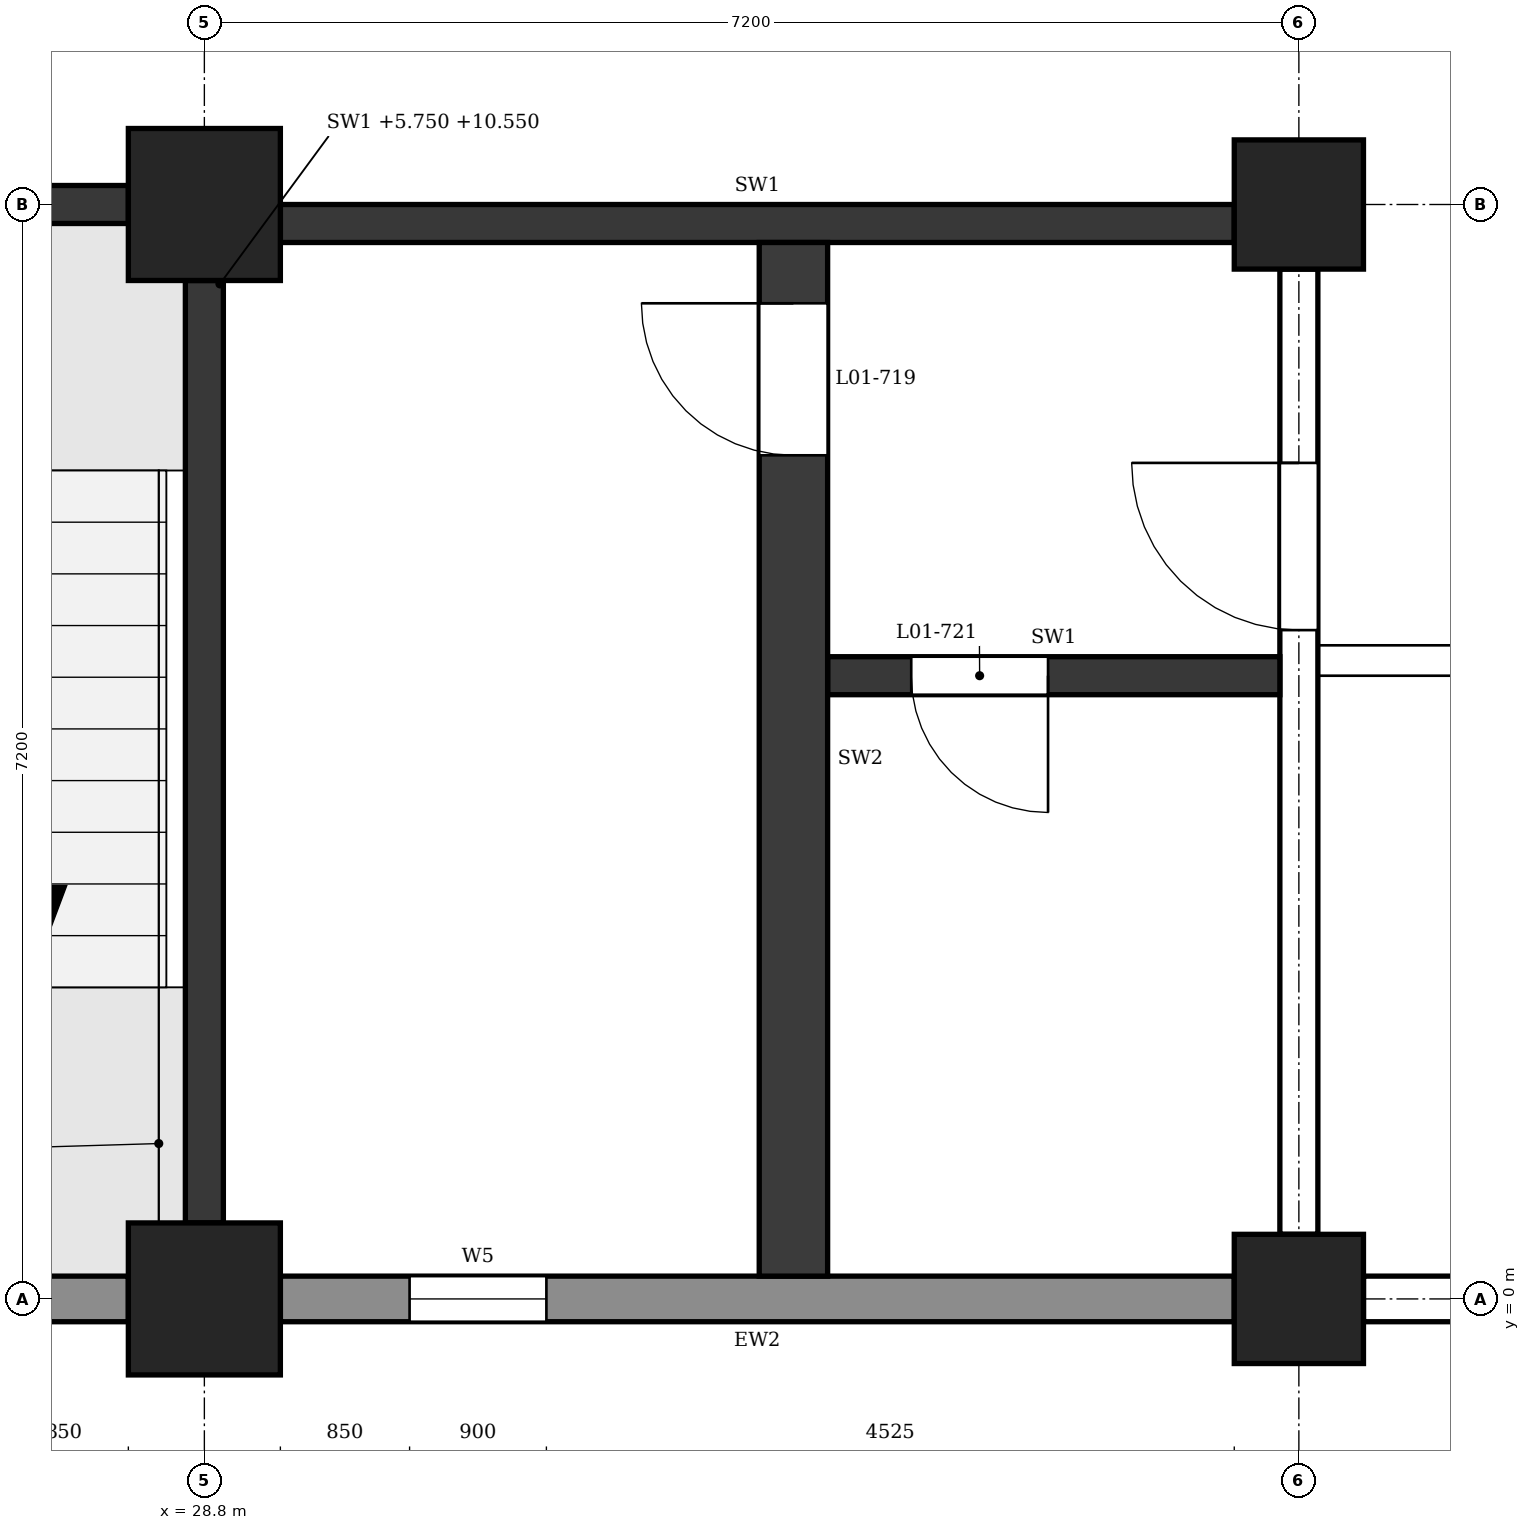
"""IFC4 building model, lengths in metres.
Left out: names, types, materials, properties, quantities, classifications, styles, units other than length and angle.
Written with IfcOpenShell. Run it as: python <this file> out.ifc"""

import sys

from ifc_helpers import new_model, si_unit, direction, frame, frame_2d, origin, origin_2d, place, context, subcontext, project, spatial, polyline, rectangle, outline, extrude, element, fill, save


model = new_model("IFC4")
c1 = context("Model", 3, precision=1e-05, world=origin(), true_north=direction((0.0, 1.0)))
c2 = subcontext(c1, "Body", "Model", "MODEL_VIEW")
j1 = project(units=[si_unit("LENGTHUNIT", "METRE"), si_unit("PLANEANGLEUNIT", "RADIAN")], contexts=[c1])
p1 = place(None, origin())
s1 = spatial("IfcSite", under=j1, at=p1, CompositionType="ELEMENT")
p2 = place(p1, origin())
s2 = spatial("IfcBuilding", under=s1, at=p2, CompositionType="ELEMENT")
p3 = place(p2, frame((0.0, 0.0, 6.0)))
s3 = spatial("IfcBuildingStorey", under=s2, at=p3, CompositionType="ELEMENT", Elevation=6.0)
for number, where, z_axis, x_axis in (
    (1, (28.8, 0.0, 0.0), (0.0, 0.0, 1.0), (1.0, 0.0, 0.0)),
    (2, (28.8, 7.2, 0.0), (0.0, 0.0, 1.0), (1.0, 0.0, 0.0)),
):
    element("IfcColumn", number, at=place(p3, frame(where, z_axis=z_axis, x_axis=x_axis)), inside=s3, PredefinedType="COLUMN", context=c2, shape_type="SweptSolid", body=[
        extrude(rectangle(XDim=1.0, YDim=1.0, at=origin_2d()), origin(), (0.0, 0.0, 1.0), 5.4),
    ])
for number, where, z_axis, x_axis in (
    (3, (36.0, 0.0, 0.0), (0.0, 0.0, 1.0), (1.0, 0.0, 0.0)),
    (4, (36.0, 7.2, 0.0), (0.0, 0.0, 1.0), (1.0, 0.0, 0.0)),
):
    element("IfcColumn", number, at=place(p3, frame(where, z_axis=z_axis, x_axis=x_axis)), inside=s3, PredefinedType="COLUMN", context=c2, shape_type="SweptSolid", body=[
        extrude(rectangle(XDim=0.85, YDim=0.85, at=origin_2d()), origin(), (0.0, 0.0, 1.0), 5.4),
    ])
p4 = place(p3, frame((22.1, 0.0, 0.0), z_axis=(0.0, 0.0, 1.0), x_axis=(1.0, 0.0, 0.0)))
e5 = element("IfcWall", 5, at=p4, inside=s3, PredefinedType="STANDARD", context=c2, shape_type="SweptSolid", body=[
    extrude(rectangle(XDim=6.2, YDim=0.3, at=frame_2d((3.1, 0.0))), origin(), (0.0, 0.0, 1.0), 4.55),
])
p5 = place(p4, frame((4.45, 0.0, 0.9)))
e6 = element("IfcOpeningElement", 6, at=p5, cuts=e5, PredefinedType="OPENING", context=c2, shape_type="SweptSolid", body=[
    extrude(outline(polyline([(0.0, 0.0), (0.9, 0.0), (0.9, 3.15), (0.45, 3.6), (0.0, 3.15), (0.0, 0.0)])), frame((0.0, 0.16, 0.0), z_axis=(0.0, -1.0, 0.0), x_axis=(1.0, 0.0, 0.0)), (0.0, 0.0, 1.0), 0.32),
])
p6 = place(p3, frame((29.3, 0.0, 0.0), z_axis=(0.0, 0.0, 1.0), x_axis=(1.0, 0.0, 0.0)))
e7 = element("IfcWall", 7, at=p6, inside=s3, PredefinedType="STANDARD", context=c2, shape_type="SweptSolid", body=[
    extrude(rectangle(XDim=6.275, YDim=0.3, at=frame_2d((3.137, 0.0))), origin(), (0.0, 0.0, 1.0), 4.7),
])
p7 = place(p6, frame((0.85, 0.0, 0.9)))
e8 = element("IfcOpeningElement", 8, at=p7, cuts=e7, PredefinedType="OPENING", context=c2, shape_type="SweptSolid", body=[
    extrude(outline(polyline([(0.0, 0.0), (0.9, 0.0), (0.9, 3.15), (0.45, 3.6), (0.0, 3.15), (0.0, 0.0)])), frame((0.0, 0.16, 0.0), z_axis=(0.0, -1.0, 0.0), x_axis=(1.0, 0.0, 0.0)), (0.0, 0.0, 1.0), 0.32),
])
p8 = place(p3, frame((36.425, 0.0, 0.0), z_axis=(0.0, 0.0, 1.0), x_axis=(1.0, 0.0, 0.0)))
e9 = element("IfcWall", 9, at=p8, inside=s3, PredefinedType="STANDARD", context=c2, shape_type="SweptSolid", body=[
    extrude(rectangle(XDim=6.35, YDim=0.3, at=frame_2d((3.175, 0.0))), origin(), (0.0, 0.0, 1.0), 4.7),
])
p9 = place(p8, frame((0.625, 0.0, 0.9)))
e10 = element("IfcOpeningElement", 10, at=p9, cuts=e9, PredefinedType="OPENING", context=c2, shape_type="SweptSolid", body=[
    extrude(outline(polyline([(0.0, 0.0), (1.5, 0.0), (1.5, 2.85), (0.75, 3.6), (0.0, 2.85), (0.0, 0.0)])), frame((0.0, 0.16, 0.0), z_axis=(0.0, -1.0, 0.0), x_axis=(1.0, 0.0, 0.0)), (0.0, 0.0, 1.0), 0.32),
])
p10 = place(p8, frame((4.225, 0.0, 0.9)))
e11 = element("IfcOpeningElement", 11, at=p10, cuts=e9, PredefinedType="OPENING", context=c2, shape_type="SweptSolid", body=[
    extrude(outline(polyline([(0.0, 0.0), (1.5, 0.0), (1.5, 2.85), (0.75, 3.6), (0.0, 2.85), (0.0, 0.0)])), frame((0.0, 0.16, 0.0), z_axis=(0.0, -1.0, 0.0), x_axis=(1.0, 0.0, 0.0)), (0.0, 0.0, 1.0), 0.32),
])
p11 = place(p3, frame((29.3, 7.075, 0.0), z_axis=(0.0, 0.0, 1.0), x_axis=(1.0, 0.0, 0.0)))
e12 = element("IfcWall", 12, at=p11, inside=s3, PredefinedType="SHEAR", context=c2, shape_type="SweptSolid", body=[
    extrude(rectangle(XDim=6.275, YDim=0.25, at=frame_2d((3.137, 0.0))), origin(), (0.0, 0.0, 1.0), 4.7),
])
p12 = place(p3, frame((28.8, 0.5, -0.25), z_axis=(0.0, 0.0, 1.0), x_axis=(0.0, 1.0, 0.0)))
e13 = element("IfcWall", 13, at=p12, inside=s3, PredefinedType="SHEAR", context=c2, shape_type="SweptSolid", body=[
    extrude(rectangle(XDim=6.2, YDim=0.25, at=frame_2d((3.1, 0.0))), origin(), (0.0, 0.0, 1.0), 4.8),
])
p13 = place(p3, frame((36.0, 0.425, 0.0), z_axis=(0.0, 0.0, 1.0), x_axis=(0.0, 1.0, 0.0)))
e14 = element("IfcWall", 14, at=p13, inside=s3, PredefinedType="SHEAR", context=c2, shape_type="SweptSolid", body=[
    extrude(rectangle(XDim=6.35, YDim=0.25, at=frame_2d((3.175, 0.0))), origin(), (0.0, 0.0, 1.0), 4.7),
])
p14 = place(p13, frame((3.975, 0.0, 0.0)))
e15 = element("IfcOpeningElement", 15, at=p14, cuts=e14, PredefinedType="OPENING", context=c2, shape_type="SweptSolid", body=[
    extrude(rectangle(XDim=1.1, YDim=2.1, at=frame_2d((0.55, 1.05))), frame((0.0, 0.135, 0.0), z_axis=(0.0, -1.0, 0.0), x_axis=(1.0, 0.0, 0.0)), (0.0, 0.0, 1.0), 0.27),
])
p15 = place(p3, frame((32.675, 0.15, 0.0), z_axis=(0.0, 0.0, 1.0), x_axis=(0.0, 1.0, 0.0)))
e16 = element("IfcWall", 16, at=p15, inside=s3, PredefinedType="SHEAR", context=c2, shape_type="SweptSolid", body=[
    extrude(rectangle(XDim=6.8, YDim=0.45, at=frame_2d((3.4, 0.0))), origin(), (0.0, 0.0, 1.0), 4.7),
])
p16 = place(p15, frame((5.4, 0.0, 0.0)))
e17 = element("IfcOpeningElement", 17, at=p16, cuts=e16, PredefinedType="OPENING", context=c2, shape_type="SweptSolid", body=[
    extrude(rectangle(XDim=1.0, YDim=2.1, at=frame_2d((0.5, 1.05))), frame((0.0, 0.235, 0.0), z_axis=(0.0, -1.0, 0.0), x_axis=(1.0, 0.0, 0.0)), (0.0, 0.0, 1.0), 0.47),
])
p17 = place(p3, frame((32.9, 4.1, 0.0), z_axis=(0.0, 0.0, 1.0), x_axis=(1.0, 0.0, 0.0)))
e18 = element("IfcWall", 18, at=p17, inside=s3, PredefinedType="SHEAR", context=c2, shape_type="SweptSolid", body=[
    extrude(rectangle(XDim=2.975, YDim=0.25, at=frame_2d((1.488, 0.0))), origin(), (0.0, 0.0, 1.0), 4.7),
])
p18 = place(p17, frame((0.55, 0.0, 0.0)))
e19 = element("IfcOpeningElement", 19, at=p18, cuts=e18, PredefinedType="OPENING", context=c2, shape_type="SweptSolid", body=[
    extrude(rectangle(XDim=0.9, YDim=2.1, at=frame_2d((0.45, 1.05))), frame((0.0, 0.135, 0.0), z_axis=(0.0, -1.0, 0.0), x_axis=(1.0, 0.0, 0.0)), (0.0, 0.0, 1.0), 0.27),
])
p19 = place(p3, frame((22.1, 7.2, 0.0), z_axis=(0.0, 0.0, 1.0), x_axis=(1.0, 0.0, 0.0)))
e20 = element("IfcWall", 20, at=p19, inside=s3, PredefinedType="SHEAR", context=c2, shape_type="SweptSolid", body=[
    extrude(rectangle(XDim=6.2, YDim=0.25, at=frame_2d((3.1, 0.0))), origin(), (0.0, 0.0, 1.0), 4.4),
])
p20 = place(p19, frame((0.35, 0.0, 0.0)))
e21 = element("IfcOpeningElement", 21, at=p20, cuts=e20, PredefinedType="OPENING", context=c2, shape_type="SweptSolid", body=[
    extrude(rectangle(XDim=1.1, YDim=2.1, at=frame_2d((0.55, 1.05))), frame((0.0, 0.135, 0.0), z_axis=(0.0, -1.0, 0.0), x_axis=(1.0, 0.0, 0.0)), (0.0, 0.0, 1.0), 0.27),
])
p21 = place(p2, origin())
s4 = spatial("IfcBuildingStorey", under=s2, at=p21, CompositionType="ELEMENT", Elevation=0.0)
p22 = place(p21, frame((29.3, 7.4, 0.0), z_axis=(0.0, 0.0, 1.0), x_axis=(1.0, 0.0, 0.0)))
e22 = element("IfcWall", 22, at=p22, inside=s4, PredefinedType="SOLIDWALL", context=c2, shape_type="SweptSolid", body=[
    extrude(rectangle(XDim=6.275, YDim=0.4, at=frame_2d((3.137, 0.0))), origin(), (0.0, 0.0, 1.0), 10.7),
])
p23 = place(p21, frame((36.425, 7.4, 0.0), z_axis=(0.0, 0.0, 1.0), x_axis=(1.0, 0.0, 0.0)))
e23 = element("IfcWall", 23, at=p23, inside=s4, PredefinedType="SOLIDWALL", context=c2, shape_type="SweptSolid", body=[
    extrude(rectangle(XDim=6.35, YDim=0.4, at=frame_2d((3.175, 0.0))), origin(), (0.0, 0.0, 1.0), 10.7),
])
p24 = place(p21, frame((29.0, 7.7, 0.0), z_axis=(0.0, 0.0, 1.0), x_axis=(0.0, 1.0, 0.0)))
e24 = element("IfcWall", 24, at=p24, inside=s4, PredefinedType="SOLIDWALL", context=c2, shape_type="SweptSolid", body=[
    extrude(rectangle(XDim=6.2, YDim=0.4, at=frame_2d((3.1, 0.0))), origin(), (0.0, 0.0, 1.0), 10.55),
])
p25 = place(p3, frame((36.125, 4.2, 0.0), z_axis=(0.0, 0.0, 1.0), x_axis=(1.0, 0.0, 0.0)))
e25 = element("IfcWall", 25, at=p25, inside=s3, PredefinedType="PARTITIONING", context=c2, shape_type="SweptSolid", body=[
    extrude(rectangle(XDim=7.075, YDim=0.2, at=frame_2d((3.538, 0.0))), origin(), (0.0, 0.0, 1.0), 4.7),
])
p26 = place(p25, frame((1.238, 0.0, 0.0)))
e26 = element("IfcOpeningElement", 26, at=p26, cuts=e25, PredefinedType="OPENING", context=c2, shape_type="SweptSolid", body=[
    extrude(rectangle(XDim=1.0, YDim=2.1, at=frame_2d((0.5, 1.05))), frame((0.0, 0.11, 0.0), z_axis=(0.0, -1.0, 0.0), x_axis=(1.0, 0.0, 0.0)), (0.0, 0.0, 1.0), 0.22),
])
p27 = place(p7, origin())
e27 = element("IfcWindow", 27, at=p27, inside=s3, PartitioningType="SINGLE_PANEL", PredefinedType="WINDOW", context=c2, shape_type="SweptSolid", body=[
    extrude(outline(polyline([(0.0, 0.0), (0.9, 0.0), (0.9, 3.15), (0.45, 3.6), (0.0, 3.15), (0.0, 0.0)])), frame((0.0, 0.03, 0.0), z_axis=(0.0, -1.0, 0.0), x_axis=(1.0, 0.0, 0.0)), (0.0, 0.0, 1.0), 0.06),
])
fill(e8, e27)
p28 = place(p16, origin())
e28 = element("IfcDoor", 28, at=p28, inside=s3, OperationType="SINGLE_SWING_RIGHT", PredefinedType="DOOR", context=c2, shape_type="SweptSolid", body=[
    extrude(rectangle(XDim=1.0, YDim=2.1, at=frame_2d((0.5, 1.05))), frame((0.0, 0.025, 0.0), z_axis=(0.0, -1.0, 0.0), x_axis=(1.0, 0.0, 0.0)), (0.0, 0.0, 1.0), 0.05),
])
fill(e17, e28)
p29 = place(p14, origin())
e29 = element("IfcDoor", 29, at=p29, inside=s3, OperationType="SINGLE_SWING_RIGHT", PredefinedType="DOOR", context=c2, shape_type="SweptSolid", body=[
    extrude(rectangle(XDim=1.1, YDim=2.1, at=frame_2d((0.55, 1.05))), frame((0.0, 0.025, 0.0), z_axis=(0.0, -1.0, 0.0), x_axis=(1.0, 0.0, 0.0)), (0.0, 0.0, 1.0), 0.05),
])
fill(e15, e29)
p30 = place(p18, frame((0.9, 0.0, 0.0), z_axis=(0.0, 0.0, 1.0), x_axis=(-1.0, 0.0, 0.0)))
e30 = element("IfcDoor", 30, at=p30, inside=s3, OperationType="SINGLE_SWING_LEFT", PredefinedType="DOOR", context=c2, shape_type="SweptSolid", body=[
    extrude(rectangle(XDim=0.9, YDim=2.1, at=frame_2d((0.45, 1.05))), frame((0.0, 0.025, 0.0), z_axis=(0.0, -1.0, 0.0), x_axis=(1.0, 0.0, 0.0)), (0.0, 0.0, 1.0), 0.05),
])
fill(e19, e30)
save(model, sys.argv[1])
